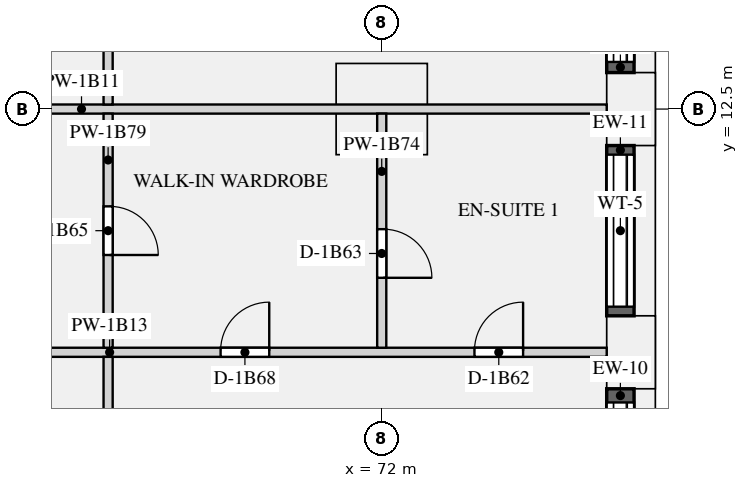
"""IFC4 building model, lengths in metres.
Left out: names, types, materials, properties, quantities, classifications, styles, units other than length and angle.
Written with IfcOpenShell. Run it as: python <this file> out.ifc"""

import sys

from ifc_helpers import new_model, si_unit, direction, frame, frame_2d, origin, origin_2d, place, context, subcontext, project, spatial, rectangle, extrude, element, fill, save


model = new_model("IFC4")
c1 = context("Model", 3, precision=1e-05, world=origin(), true_north=direction((0.0, 1.0)))
c2 = subcontext(c1, "Body", "Model", "MODEL_VIEW")
j1 = project(units=[si_unit("LENGTHUNIT", "METRE"), si_unit("PLANEANGLEUNIT", "RADIAN")], contexts=[c1])
p1 = place(None, origin())
s1 = spatial("IfcSite", under=j1, at=p1, CompositionType="ELEMENT")
p2 = place(p1, origin())
s2 = spatial("IfcBuilding", under=s1, at=p2, CompositionType="ELEMENT")
p3 = place(p2, frame((0.0, 0.0, 28.95)))
s3 = spatial("IfcBuildingStorey", under=s2, at=p3, CompositionType="ELEMENT", Elevation=28.95)
for number, where, z_axis, x_axis in (
    (1, (76.1, 8.5, 0.0), (0.0, 0.0, 1.0), (0.0, 1.0, 0.0)),
    (2, (76.1, 12.5, 0.0), (0.0, 0.0, 1.0), (0.0, 1.0, 0.0)),
):
    element("IfcColumn", number, at=place(p3, frame(where, z_axis=z_axis, x_axis=x_axis)), inside=s3, PredefinedType="USERDEFINED", context=c2, shape_type="SweptSolid", body=[
        extrude(rectangle(XDim=1.2, YDim=0.8, at=origin_2d()), origin(), (0.0, 0.0, 1.0), 3.15),
    ])
p4 = place(p3, frame((72.0, 12.5, 0.0), z_axis=(0.0, 0.0, 1.0), x_axis=(1.0, 0.0, 0.0)))
e3 = element("IfcColumn", 3, at=p4, inside=s3, PredefinedType="COLUMN", context=c2, shape_type="SweptSolid", body=[
    extrude(rectangle(XDim=1.5, YDim=1.5, at=origin_2d()), origin(), (0.0, 0.0, 1.0), 3.15),
])
p5 = place(p3, frame((75.925, 5.7, 0.9), z_axis=(0.0, 0.0, 1.0), x_axis=(0.0, 1.0, 0.0)))
e4 = element("IfcWall", 4, at=p5, inside=s3, PredefinedType="SOLIDWALL", context=c2, shape_type="SweptSolid", body=[
    extrude(rectangle(XDim=2.2, YDim=0.45, at=frame_2d((1.1, 0.0))), origin(), (0.0, 0.0, 1.0), 1.93),
])
p6 = place(p5, frame((0.225, 0.0, 0.15)))
e5 = element("IfcOpeningElement", 5, at=p6, cuts=e4, PredefinedType="OPENING", context=c2, shape_type="SweptSolid", body=[
    extrude(rectangle(XDim=1.75, YDim=1.5, at=frame_2d((0.875, 0.75))), frame((0.0, 0.235, 0.0), z_axis=(0.0, -1.0, 0.0), x_axis=(1.0, 0.0, 0.0)), (0.0, 0.0, 1.0), 0.47),
])
p7 = place(p3, frame((75.925, 9.1, 0.9), z_axis=(0.0, 0.0, 1.0), x_axis=(0.0, 1.0, 0.0)))
e6 = element("IfcWall", 6, at=p7, inside=s3, PredefinedType="SOLIDWALL", context=c2, shape_type="SweptSolid", body=[
    extrude(rectangle(XDim=2.8, YDim=0.45, at=frame_2d((1.4, 0.0))), origin(), (0.0, 0.0, 1.0), 1.93),
])
p8 = place(p7, frame((0.15, 0.0, 0.15)))
e7 = element("IfcOpeningElement", 7, at=p8, cuts=e6, PredefinedType="OPENING", context=c2, shape_type="SweptSolid", body=[
    extrude(rectangle(XDim=2.5, YDim=1.5, at=frame_2d((1.25, 0.75))), frame((0.0, 0.235, 0.0), z_axis=(0.0, -1.0, 0.0), x_axis=(1.0, 0.0, 0.0)), (0.0, 0.0, 1.0), 0.47),
])
p9 = place(p3, frame((75.925, 13.1, 0.9), z_axis=(0.0, 0.0, 1.0), x_axis=(0.0, 1.0, 0.0)))
e8 = element("IfcWall", 8, at=p9, inside=s3, PredefinedType="SOLIDWALL", context=c2, shape_type="SweptSolid", body=[
    extrude(rectangle(XDim=2.6, YDim=0.45, at=frame_2d((1.3, 0.0))), origin(), (0.0, 0.0, 1.0), 1.93),
])
p10 = place(p9, frame((0.175, 0.0, 0.15)))
e9 = element("IfcOpeningElement", 9, at=p10, cuts=e8, PredefinedType="OPENING", context=c2, shape_type="SweptSolid", body=[
    extrude(rectangle(XDim=2.25, YDim=1.5, at=frame_2d((1.125, 0.75))), frame((0.0, 0.235, 0.0), z_axis=(0.0, -1.0, 0.0), x_axis=(1.0, 0.0, 0.0)), (0.0, 0.0, 1.0), 0.47),
])
p11 = place(p3, frame((58.425, 12.5, 0.0), z_axis=(0.0, 0.0, 1.0), x_axis=(1.0, 0.0, 0.0)))
e10 = element("IfcWall", 10, at=p11, inside=s3, PredefinedType="PARTITIONING", context=c2, shape_type="SweptSolid", body=[
    extrude(rectangle(XDim=17.275, YDim=0.15, at=frame_2d((8.637, 0.0))), origin(), (0.0, 0.0, 1.0), 2.83),
])
p12 = place(p3, frame((54.0, 8.5, 0.0), z_axis=(0.0, 0.0, 1.0), x_axis=(1.0, 0.0, 0.0)))
e11 = element("IfcWall", 11, at=p12, inside=s3, PredefinedType="PARTITIONING", context=c2, shape_type="SweptSolid", body=[
    extrude(rectangle(XDim=21.7, YDim=0.15, at=frame_2d((10.85, 0.0))), origin(), (0.0, 0.0, 1.0), 2.83),
])
p13 = place(p12, frame((1.8, 0.0, 0.0)))
e12 = element("IfcOpeningElement", 12, at=p13, cuts=e11, PredefinedType="OPENING", context=c2, shape_type="SweptSolid", body=[
    extrude(rectangle(XDim=0.9, YDim=2.1, at=frame_2d((0.45, 1.05))), frame((0.0, 0.085, 0.0), z_axis=(0.0, -1.0, 0.0), x_axis=(1.0, 0.0, 0.0)), (0.0, 0.0, 1.0), 0.17),
])
p14 = place(p12, frame((6.3, 0.0, 0.0)))
e13 = element("IfcOpeningElement", 13, at=p14, cuts=e11, PredefinedType="OPENING", context=c2, shape_type="SweptSolid", body=[
    extrude(rectangle(XDim=0.9, YDim=2.1, at=frame_2d((0.45, 1.05))), frame((0.0, 0.085, 0.0), z_axis=(0.0, -1.0, 0.0), x_axis=(1.0, 0.0, 0.0)), (0.0, 0.0, 1.0), 0.17),
])
p15 = place(p12, frame((10.8, 0.0, 0.0)))
e14 = element("IfcOpeningElement", 14, at=p15, cuts=e11, PredefinedType="OPENING", context=c2, shape_type="SweptSolid", body=[
    extrude(rectangle(XDim=0.9, YDim=2.1, at=frame_2d((0.45, 1.05))), frame((0.0, 0.085, 0.0), z_axis=(0.0, -1.0, 0.0), x_axis=(1.0, 0.0, 0.0)), (0.0, 0.0, 1.0), 0.17),
])
p16 = place(p12, frame((19.525, 0.0, 0.0)))
e15 = element("IfcOpeningElement", 15, at=p16, cuts=e11, PredefinedType="OPENING", context=c2, shape_type="SweptSolid", body=[
    extrude(rectangle(XDim=0.8, YDim=2.1, at=frame_2d((0.4, 1.05))), frame((0.0, 0.085, 0.0), z_axis=(0.0, -1.0, 0.0), x_axis=(1.0, 0.0, 0.0)), (0.0, 0.0, 1.0), 0.17),
])
p17 = place(p12, frame((15.35, 0.0, 0.0)))
e16 = element("IfcOpeningElement", 16, at=p17, cuts=e11, PredefinedType="OPENING", context=c2, shape_type="SweptSolid", body=[
    extrude(rectangle(XDim=0.8, YDim=2.1, at=frame_2d((0.4, 1.05))), frame((0.0, 0.085, 0.0), z_axis=(0.0, -1.0, 0.0), x_axis=(1.0, 0.0, 0.0)), (0.0, 0.0, 1.0), 0.17),
])
p18 = place(p3, frame((72.0, 8.575, 0.0), z_axis=(0.0, 0.0, 1.0), x_axis=(0.0, 1.0, 0.0)))
e17 = element("IfcWall", 17, at=p18, inside=s3, PredefinedType="PARTITIONING", context=c2, shape_type="SweptSolid", body=[
    extrude(rectangle(XDim=3.85, YDim=0.15, at=frame_2d((1.925, 0.0))), origin(), (0.0, 0.0, 1.0), 2.83),
])
p19 = place(p18, frame((1.15, 0.0, 0.0)))
e18 = element("IfcOpeningElement", 18, at=p19, cuts=e17, PredefinedType="OPENING", context=c2, shape_type="SweptSolid", body=[
    extrude(rectangle(XDim=0.8, YDim=2.1, at=frame_2d((0.4, 1.05))), frame((0.0, 0.085, 0.0), z_axis=(0.0, -1.0, 0.0), x_axis=(1.0, 0.0, 0.0)), (0.0, 0.0, 1.0), 0.17),
])
p20 = place(p3, frame((67.5, 0.8, 0.0), z_axis=(0.0, 0.0, 1.0), x_axis=(0.0, 1.0, 0.0)))
e19 = element("IfcWall", 19, at=p20, inside=s3, PredefinedType="PARTITIONING", context=c2, shape_type="SweptSolid", body=[
    extrude(rectangle(XDim=7.625, YDim=0.15, at=frame_2d((3.812, 0.0))), origin(), (0.0, 0.0, 1.0), 2.83),
])
p21 = place(p3, frame((67.5, 8.575, 0.0), z_axis=(0.0, 0.0, 1.0), x_axis=(0.0, 1.0, 0.0)))
e20 = element("IfcWall", 20, at=p21, inside=s3, PredefinedType="PARTITIONING", context=c2, shape_type="SweptSolid", body=[
    extrude(rectangle(XDim=3.85, YDim=0.15, at=frame_2d((1.925, 0.0))), origin(), (0.0, 0.0, 1.0), 2.83),
])
p22 = place(p21, frame((1.525, 0.0, 0.0)))
e21 = element("IfcOpeningElement", 21, at=p22, cuts=e20, PredefinedType="OPENING", context=c2, shape_type="SweptSolid", body=[
    extrude(rectangle(XDim=0.8, YDim=2.1, at=frame_2d((0.4, 1.05))), frame((0.0, 0.085, 0.0), z_axis=(0.0, -1.0, 0.0), x_axis=(1.0, 0.0, 0.0)), (0.0, 0.0, 1.0), 0.17),
])
p23 = place(p3, frame((67.5, 12.575, 0.0), z_axis=(0.0, 0.0, 1.0), x_axis=(0.0, 1.0, 0.0)))
e22 = element("IfcWall", 22, at=p23, inside=s3, PredefinedType="PARTITIONING", context=c2, shape_type="SweptSolid", body=[
    extrude(rectangle(XDim=11.35, YDim=0.15, at=frame_2d((5.675, 0.0))), origin(), (0.0, 0.0, 1.0), 2.83),
])
p24 = place(p23, frame((7.225, 0.0, 0.0)))
e23 = element("IfcOpeningElement", 23, at=p24, cuts=e22, PredefinedType="OPENING", context=c2, shape_type="SweptSolid", body=[
    extrude(rectangle(XDim=0.9, YDim=2.1, at=frame_2d((0.45, 1.05))), frame((0.0, 0.085, 0.0), z_axis=(0.0, -1.0, 0.0), x_axis=(1.0, 0.0, 0.0)), (0.0, 0.0, 1.0), 0.17),
])
p25 = place(p6, origin())
e24 = element("IfcWindow", 24, at=p25, inside=s3, PartitioningType="SINGLE_PANEL", PredefinedType="WINDOW", context=c2, shape_type="SweptSolid", body=[
    extrude(rectangle(XDim=1.75, YDim=1.5, at=frame_2d((0.875, 0.75))), frame((0.0, -0.065, 0.0), z_axis=(0.0, -1.0, 0.0), x_axis=(1.0, 0.0, 0.0)), (0.0, 0.0, 1.0), 0.06),
])
fill(e5, e24)
p26 = place(p8, origin())
e25 = element("IfcWindow", 25, at=p26, inside=s3, PartitioningType="SINGLE_PANEL", PredefinedType="WINDOW", context=c2, shape_type="SweptSolid", body=[
    extrude(rectangle(XDim=2.5, YDim=1.5, at=frame_2d((1.25, 0.75))), frame((0.0, -0.065, 0.0), z_axis=(0.0, -1.0, 0.0), x_axis=(1.0, 0.0, 0.0)), (0.0, 0.0, 1.0), 0.06),
])
fill(e7, e25)
p27 = place(p10, origin())
e26 = element("IfcWindow", 26, at=p27, inside=s3, PartitioningType="SINGLE_PANEL", PredefinedType="WINDOW", context=c2, shape_type="SweptSolid", body=[
    extrude(rectangle(XDim=2.25, YDim=1.5, at=frame_2d((1.125, 0.75))), frame((0.0, -0.065, 0.0), z_axis=(0.0, -1.0, 0.0), x_axis=(1.0, 0.0, 0.0)), (0.0, 0.0, 1.0), 0.06),
])
fill(e9, e26)
p28 = place(p16, origin())
e27 = element("IfcDoor", 27, at=p28, inside=s3, OperationType="SINGLE_SWING_RIGHT", PredefinedType="DOOR", context=c2, shape_type="SweptSolid", body=[
    extrude(rectangle(XDim=0.8, YDim=2.1, at=frame_2d((0.4, 1.05))), frame((0.0, 0.025, 0.0), z_axis=(0.0, -1.0, 0.0), x_axis=(1.0, 0.0, 0.0)), (0.0, 0.0, 1.0), 0.05),
])
fill(e15, e27)
p29 = place(p19, frame((0.8, 0.0, 0.0), z_axis=(0.0, 0.0, 1.0), x_axis=(-1.0, 0.0, 0.0)))
e28 = element("IfcDoor", 28, at=p29, inside=s3, OperationType="SINGLE_SWING_RIGHT", PredefinedType="DOOR", context=c2, shape_type="SweptSolid", body=[
    extrude(rectangle(XDim=0.8, YDim=2.1, at=frame_2d((0.4, 1.05))), frame((0.0, 0.025, 0.0), z_axis=(0.0, -1.0, 0.0), x_axis=(1.0, 0.0, 0.0)), (0.0, 0.0, 1.0), 0.05),
])
fill(e18, e28)
p30 = place(p22, frame((0.8, 0.0, 0.0), z_axis=(0.0, 0.0, 1.0), x_axis=(-1.0, 0.0, 0.0)))
e29 = element("IfcDoor", 29, at=p30, inside=s3, OperationType="SINGLE_SWING_RIGHT", PredefinedType="DOOR", context=c2, shape_type="SweptSolid", body=[
    extrude(rectangle(XDim=0.8, YDim=2.1, at=frame_2d((0.4, 1.05))), frame((0.0, 0.025, 0.0), z_axis=(0.0, -1.0, 0.0), x_axis=(1.0, 0.0, 0.0)), (0.0, 0.0, 1.0), 0.05),
])
fill(e21, e29)
p31 = place(p17, origin())
e30 = element("IfcDoor", 30, at=p31, inside=s3, OperationType="SINGLE_SWING_RIGHT", PredefinedType="DOOR", context=c2, shape_type="SweptSolid", body=[
    extrude(rectangle(XDim=0.8, YDim=2.1, at=frame_2d((0.4, 1.05))), frame((0.0, 0.025, 0.0), z_axis=(0.0, -1.0, 0.0), x_axis=(1.0, 0.0, 0.0)), (0.0, 0.0, 1.0), 0.05),
])
fill(e16, e30)
save(model, sys.argv[1])
